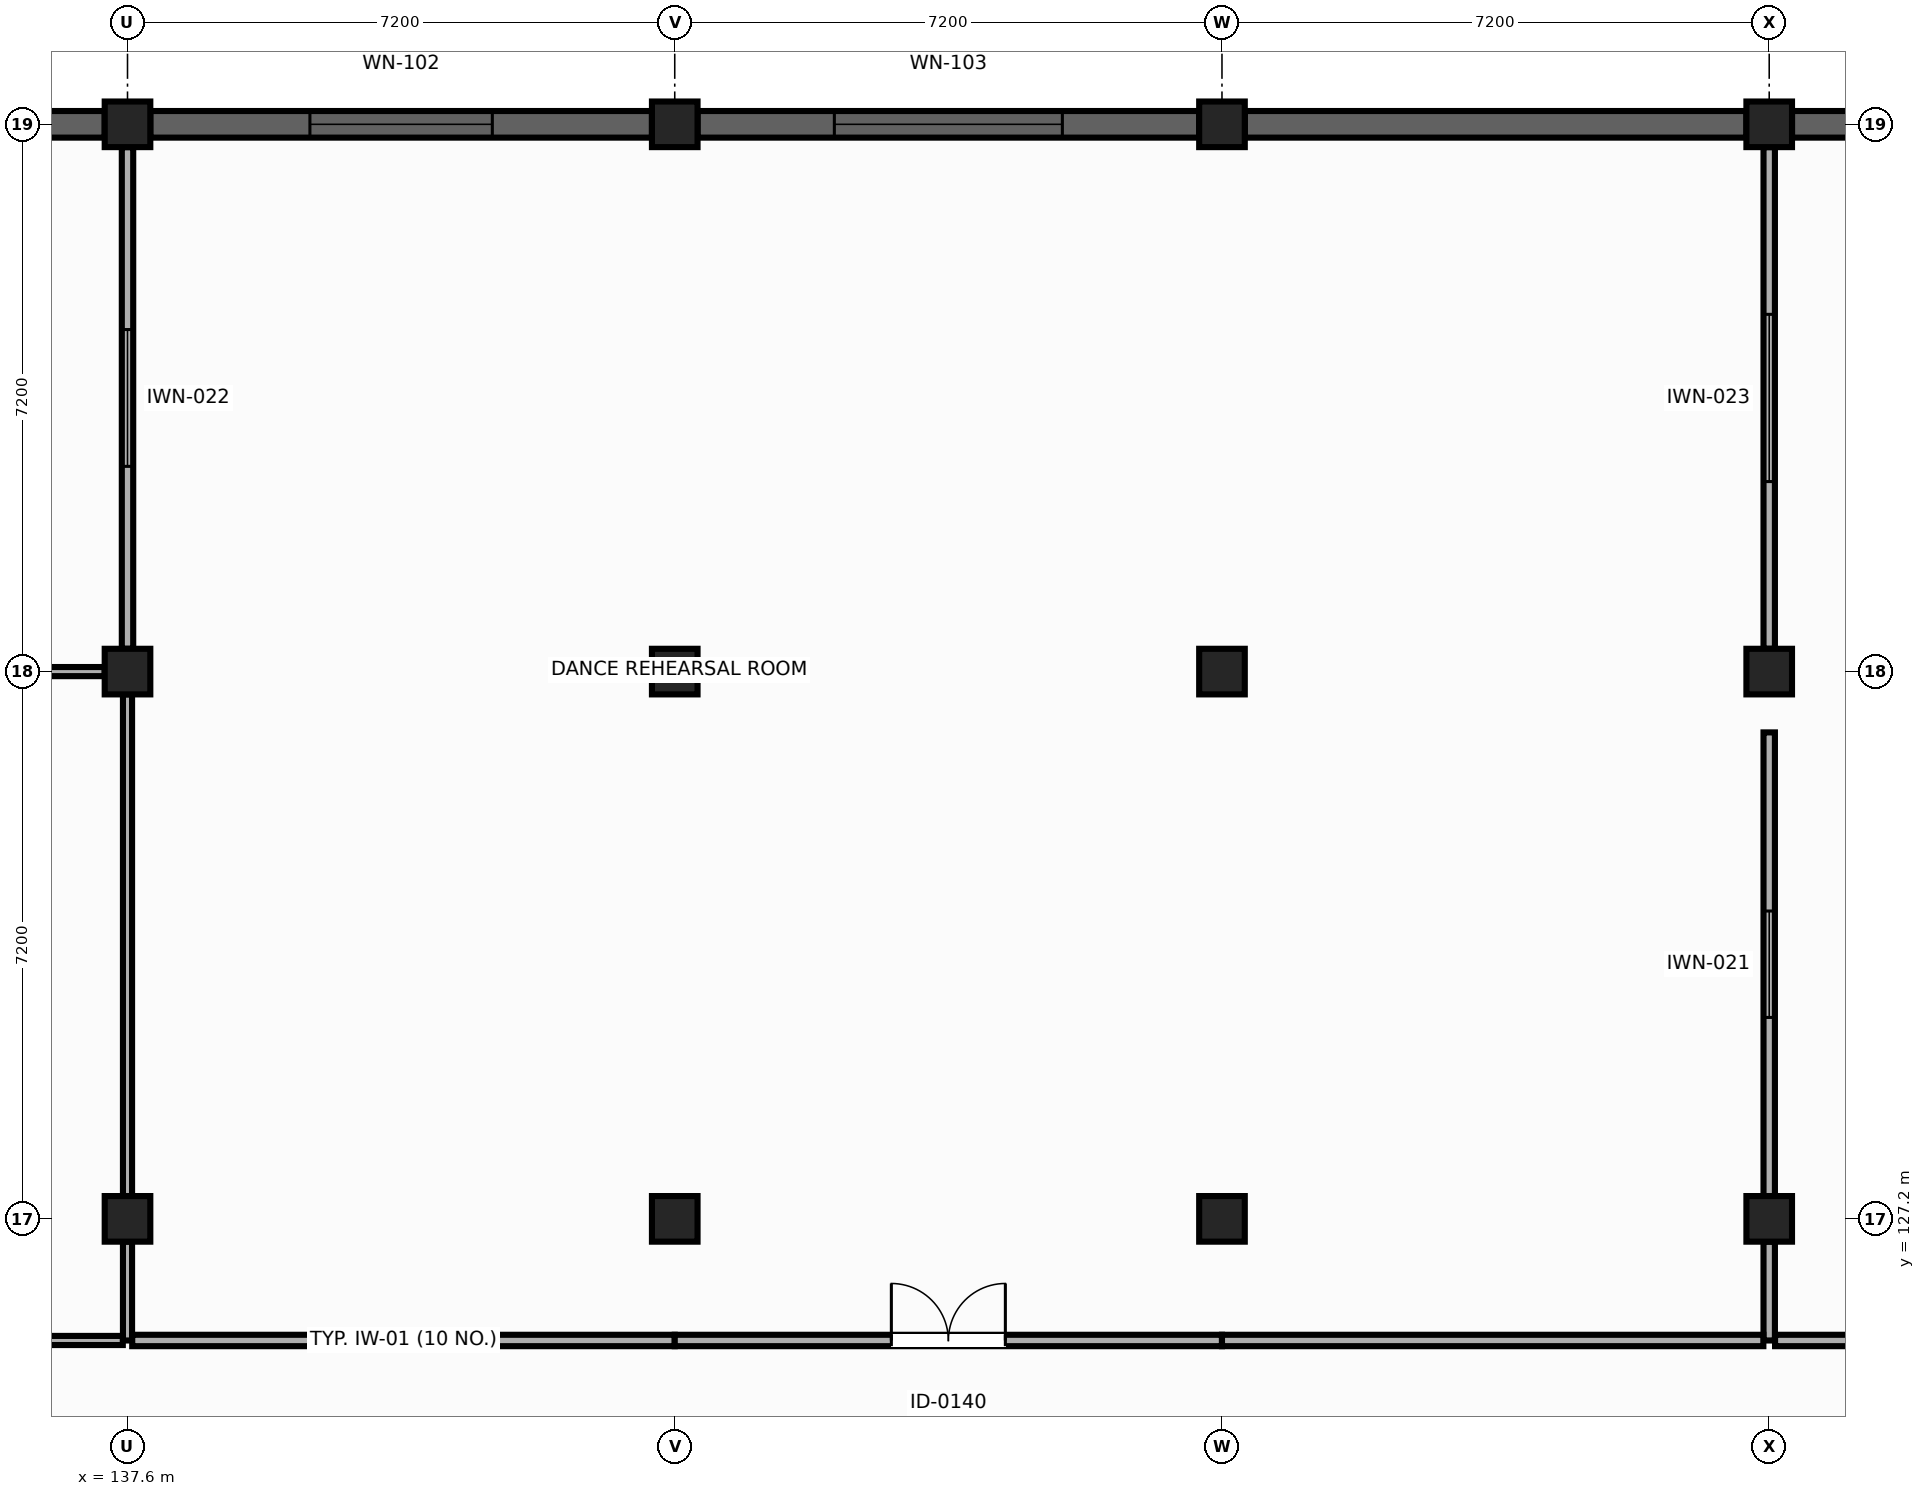
"""IFC4 building model, lengths in metres.
Left out: names, types, materials, properties, quantities, classifications, styles, units other than length and angle.
Written with IfcOpenShell. Run it as: python <this file> out.ifc"""

import sys

from ifc_helpers import new_model, si_unit, direction, frame, frame_2d, origin, origin_2d, place, context, subcontext, project, spatial, rectangle, extrude, element, fill, save


model = new_model("IFC4")
c1 = context("Model", 3, precision=1e-05, world=origin(), true_north=direction((0.0, 1.0)))
c2 = subcontext(c1, "Body", "Model", "MODEL_VIEW")
j1 = project(units=[si_unit("LENGTHUNIT", "METRE"), si_unit("PLANEANGLEUNIT", "RADIAN")], contexts=[c1])
p1 = place(None, origin())
s1 = spatial("IfcSite", under=j1, at=p1, CompositionType="ELEMENT")
p2 = place(p1, origin())
s2 = spatial("IfcBuilding", under=s1, at=p2, CompositionType="ELEMENT")
p3 = place(p2, frame((0.0, 0.0, 9.9)))
s3 = spatial("IfcBuildingStorey", under=s2, at=p3, CompositionType="ELEMENT", Elevation=9.9)
for number, where, z_axis, x_axis in (
    (1, (137.6, 127.2, 0.0), (0.0, 0.0, 1.0), (1.0, 0.0, 0.0)),
    (2, (144.8, 127.2, 0.0), (0.0, 0.0, 1.0), (1.0, 0.0, 0.0)),
    (3, (152.0, 127.2, 0.0), (0.0, 0.0, 1.0), (0.0, 1.0, 0.0)),
    (4, (159.2, 127.2, 0.0), (0.0, 0.0, 1.0), (1.0, 0.0, 0.0)),
    (5, (137.6, 134.4, 0.0), (0.0, 0.0, 1.0), (1.0, 0.0, 0.0)),
    (6, (144.8, 134.4, 0.0), (0.0, 0.0, 1.0), (0.0, 1.0, 0.0)),
    (7, (152.0, 134.4, 0.0), (0.0, 0.0, 1.0), (1.0, 0.0, 0.0)),
    (8, (159.2, 134.4, 0.0), (0.0, 0.0, 1.0), (0.0, 1.0, 0.0)),
    (9, (137.6, 141.6, 0.0), (0.0, 0.0, 1.0), (0.0, 1.0, 0.0)),
    (10, (144.8, 141.6, 0.0), (0.0, 0.0, 1.0), (1.0, 0.0, 0.0)),
    (11, (152.0, 141.6, 0.0), (0.0, 0.0, 1.0), (0.0, 1.0, 0.0)),
    (12, (159.2, 141.6, 0.0), (0.0, 0.0, 1.0), (1.0, 0.0, 0.0)),
):
    element("IfcColumn", number, at=place(p3, frame(where, z_axis=z_axis, x_axis=x_axis)), inside=s3, PredefinedType="COLUMN", context=c2, shape_type="SweptSolid", body=[
        extrude(rectangle(XDim=0.6, YDim=0.6, at=origin_2d()), origin(), (0.0, 0.0, 1.0), 4.5),
    ])
p4 = place(p3, frame((130.7, 141.6, 0.0), z_axis=(0.0, 0.0, 1.0), x_axis=(1.0, 0.0, 0.0)))
e13 = element("IfcWall", 13, at=p4, inside=s3, PredefinedType="SOLIDWALL", context=c2, shape_type="SweptSolid", body=[
    extrude(rectangle(XDim=6.6, YDim=0.35, at=frame_2d((3.3, 0.0))), origin(), (0.0, 0.0, 1.0), 4.22),
])
p5 = place(p4, frame((2.4, 0.0, 0.85)))
e14 = element("IfcOpeningElement", 14, at=p5, cuts=e13, PredefinedType="OPENING", context=c2, shape_type="SweptSolid", body=[
    extrude(rectangle(XDim=1.8, YDim=1.2, at=frame_2d((0.9, 0.6))), frame((0.0, 0.185, 0.0), z_axis=(0.0, -1.0, 0.0), x_axis=(1.0, 0.0, 0.0)), (0.0, 0.0, 1.0), 0.37),
])
p6 = place(p3, frame((137.9, 141.6, 0.0), z_axis=(0.0, 0.0, 1.0), x_axis=(1.0, 0.0, 0.0)))
e15 = element("IfcWall", 15, at=p6, inside=s3, PredefinedType="SOLIDWALL", context=c2, shape_type="SweptSolid", body=[
    extrude(rectangle(XDim=6.6, YDim=0.35, at=frame_2d((3.3, 0.0))), origin(), (0.0, 0.0, 1.0), 4.22),
])
p7 = place(p6, frame((2.1, 0.0, 0.85)))
e16 = element("IfcOpeningElement", 16, at=p7, cuts=e15, PredefinedType="OPENING", context=c2, shape_type="SweptSolid", body=[
    extrude(rectangle(XDim=2.4, YDim=1.2, at=frame_2d((1.2, 0.6))), frame((0.0, 0.185, 0.0), z_axis=(0.0, -1.0, 0.0), x_axis=(1.0, 0.0, 0.0)), (0.0, 0.0, 1.0), 0.37),
])
p8 = place(p3, frame((145.1, 141.6, 0.0), z_axis=(0.0, 0.0, 1.0), x_axis=(1.0, 0.0, 0.0)))
e17 = element("IfcWall", 17, at=p8, inside=s3, PredefinedType="SOLIDWALL", context=c2, shape_type="SweptSolid", body=[
    extrude(rectangle(XDim=6.6, YDim=0.35, at=frame_2d((3.3, 0.0))), origin(), (0.0, 0.0, 1.0), 4.22),
])
p9 = place(p8, frame((1.8, 0.0, 0.85)))
e18 = element("IfcOpeningElement", 18, at=p9, cuts=e17, PredefinedType="OPENING", context=c2, shape_type="SweptSolid", body=[
    extrude(rectangle(XDim=3.0, YDim=1.2, at=frame_2d((1.5, 0.6))), frame((0.0, 0.185, 0.0), z_axis=(0.0, -1.0, 0.0), x_axis=(1.0, 0.0, 0.0)), (0.0, 0.0, 1.0), 0.37),
])
p10 = place(p3, frame((152.3, 141.6, 0.0), z_axis=(0.0, 0.0, 1.0), x_axis=(1.0, 0.0, 0.0)))
e19 = element("IfcWall", 19, at=p10, inside=s3, PredefinedType="SOLIDWALL", context=c2, shape_type="SweptSolid", body=[
    extrude(rectangle(XDim=6.6, YDim=0.35, at=frame_2d((3.3, 0.0))), origin(), (0.0, 0.0, 1.0), 4.22),
])
p11 = place(p3, frame((159.5, 141.6, 0.0), z_axis=(0.0, 0.0, 1.0), x_axis=(1.0, 0.0, 0.0)))
e20 = element("IfcWall", 20, at=p11, inside=s3, PredefinedType="SOLIDWALL", context=c2, shape_type="SweptSolid", body=[
    extrude(rectangle(XDim=6.6, YDim=0.35, at=frame_2d((3.3, 0.0))), origin(), (0.0, 0.0, 1.0), 4.22),
])
p12 = place(p3, frame((137.6, 127.5, 0.0), z_axis=(0.0, 0.0, 1.0), x_axis=(0.0, 1.0, 0.0)))
e21 = element("IfcWall", 21, at=p12, inside=s3, PredefinedType="PARTITIONING", context=c2, shape_type="SweptSolid", body=[
    extrude(rectangle(XDim=6.6, YDim=0.12, at=frame_2d((3.3, 0.0))), origin(), (0.0, 0.0, 1.0), 3.515),
])
p13 = place(p3, frame((137.6, 125.6, 0.0), z_axis=(0.0, 0.0, 1.0), x_axis=(0.0, 1.0, 0.0)))
e22 = element("IfcWall", 22, at=p13, inside=s3, PredefinedType="PARTITIONING", context=c2, shape_type="SweptSolid", body=[
    extrude(rectangle(XDim=1.3, YDim=0.12, at=frame_2d((0.65, 0.0))), origin(), (0.0, 0.0, 1.0), 3.515),
])
p14 = place(p3, frame((137.3, 134.4, 0.0), z_axis=(0.0, 0.0, 1.0), x_axis=(-1.0, 0.0, 0.0)))
e23 = element("IfcWall", 23, at=p14, inside=s3, PredefinedType="PARTITIONING", context=c2, shape_type="SweptSolid", body=[
    extrude(rectangle(XDim=6.6, YDim=0.12, at=frame_2d((3.3, 0.0))), origin(), (0.0, 0.0, 1.0), 3.715),
])
p15 = place(p3, frame((130.4, 125.6, 0.0), z_axis=(0.0, 0.0, 1.0), x_axis=(1.0, 0.0, 0.0)))
e24 = element("IfcWall", 24, at=p15, inside=s3, PredefinedType="PARTITIONING", context=c2, shape_type="SweptSolid", body=[
    extrude(rectangle(XDim=7.138, YDim=0.12, at=frame_2d((3.569, 0.0))), origin(), (0.0, 0.0, 1.0), 3.515),
])
p16 = place(p3, frame((159.2, 127.5, 0.0), z_axis=(0.0, 0.0, 1.0), x_axis=(0.0, 1.0, 0.0)))
e25 = element("IfcWall", 25, at=p16, inside=s3, PredefinedType="PARTITIONING", context=c2, shape_type="SweptSolid", body=[
    extrude(rectangle(XDim=6.1, YDim=0.15, at=frame_2d((3.05, 0.0))), origin(), (0.0, 0.0, 1.0), 3.515),
])
p17 = place(p16, frame((2.35, 0.0, 1.1)))
e26 = element("IfcOpeningElement", 26, at=p17, cuts=e25, PredefinedType="OPENING", context=c2, shape_type="SweptSolid", body=[
    extrude(rectangle(XDim=1.4, YDim=1.3, at=frame_2d((0.7, 0.65))), frame((0.0, 0.085, 0.0), z_axis=(0.0, -1.0, 0.0), x_axis=(1.0, 0.0, 0.0)), (0.0, 0.0, 1.0), 0.17),
])
p18 = place(p3, frame((159.2, 125.6, 0.0), z_axis=(0.0, 0.0, 1.0), x_axis=(0.0, 1.0, 0.0)))
e27 = element("IfcWall", 27, at=p18, inside=s3, PredefinedType="PARTITIONING", context=c2, shape_type="SweptSolid", body=[
    extrude(rectangle(XDim=1.3, YDim=0.15, at=frame_2d((0.65, 0.0))), origin(), (0.0, 0.0, 1.0), 3.515),
])
p19 = place(p3, frame((159.2, 134.7, 0.0), z_axis=(0.0, 0.0, 1.0), x_axis=(0.0, 1.0, 0.0)))
e28 = element("IfcWall", 28, at=p19, inside=s3, PredefinedType="PARTITIONING", context=c2, shape_type="SweptSolid", body=[
    extrude(rectangle(XDim=6.6, YDim=0.15, at=frame_2d((3.3, 0.0))), origin(), (0.0, 0.0, 1.0), 3.515),
])
p20 = place(p19, frame((2.2, 0.0, 1.1)))
e29 = element("IfcOpeningElement", 29, at=p20, cuts=e28, PredefinedType="OPENING", context=c2, shape_type="SweptSolid", body=[
    extrude(rectangle(XDim=2.2, YDim=1.3, at=frame_2d((1.1, 0.65))), frame((0.0, 0.085, 0.0), z_axis=(0.0, -1.0, 0.0), x_axis=(1.0, 0.0, 0.0)), (0.0, 0.0, 1.0), 0.17),
])
p21 = place(p3, frame((137.6, 141.3, 0.0), z_axis=(0.0, 0.0, 1.0), x_axis=(0.0, -1.0, 0.0)))
e30 = element("IfcWall", 30, at=p21, inside=s3, PredefinedType="PARTITIONING", context=c2, shape_type="SweptSolid", body=[
    extrude(rectangle(XDim=6.6, YDim=0.15, at=frame_2d((3.3, 0.0))), origin(), (0.0, 0.0, 1.0), 3.515),
])
p22 = place(p21, frame((2.4, 0.0, 1.1)))
e31 = element("IfcOpeningElement", 31, at=p22, cuts=e30, PredefinedType="OPENING", context=c2, shape_type="SweptSolid", body=[
    extrude(rectangle(XDim=1.8, YDim=1.3, at=frame_2d((0.9, 0.65))), frame((0.0, 0.085, 0.0), z_axis=(0.0, -1.0, 0.0), x_axis=(1.0, 0.0, 0.0)), (0.0, 0.0, 1.0), 0.17),
])
p23 = place(p3, frame((137.662, 125.6, 0.0), z_axis=(0.0, 0.0, 1.0), x_axis=(1.0, 0.0, 0.0)))
e32 = element("IfcWall", 32, at=p23, inside=s3, PredefinedType="PARTITIONING", context=c2, shape_type="SweptSolid", body=[
    extrude(rectangle(XDim=7.138, YDim=0.15, at=frame_2d((3.569, 0.0))), origin(), (0.0, 0.0, 1.0), 3.515),
])
p24 = place(p3, frame((144.8, 125.6, 0.0), z_axis=(0.0, 0.0, 1.0), x_axis=(1.0, 0.0, 0.0)))
e33 = element("IfcWall", 33, at=p24, inside=s3, PredefinedType="PARTITIONING", context=c2, shape_type="SweptSolid", body=[
    extrude(rectangle(XDim=7.2, YDim=0.15, at=frame_2d((3.6, 0.0))), origin(), (0.0, 0.0, 1.0), 3.515),
])
p25 = place(p24, frame((2.85, 0.0, 0.0)))
e34 = element("IfcOpeningElement", 34, at=p25, cuts=e33, PredefinedType="OPENING", context=c2, shape_type="SweptSolid", body=[
    extrude(rectangle(XDim=1.5, YDim=2.2, at=frame_2d((0.75, 1.1))), frame((0.0, 0.085, 0.0), z_axis=(0.0, -1.0, 0.0), x_axis=(1.0, 0.0, 0.0)), (0.0, 0.0, 1.0), 0.17),
])
p26 = place(p3, frame((152.0, 125.6, 0.0), z_axis=(0.0, 0.0, 1.0), x_axis=(1.0, 0.0, 0.0)))
e35 = element("IfcWall", 35, at=p26, inside=s3, PredefinedType="PARTITIONING", context=c2, shape_type="SweptSolid", body=[
    extrude(rectangle(XDim=7.123, YDim=0.15, at=frame_2d((3.562, 0.0))), origin(), (0.0, 0.0, 1.0), 3.515),
])
p27 = place(p3, frame((159.277, 125.6, 0.0), z_axis=(0.0, 0.0, 1.0), x_axis=(1.0, 0.0, 0.0)))
e36 = element("IfcWall", 36, at=p27, inside=s3, PredefinedType="PARTITIONING", context=c2, shape_type="SweptSolid", body=[
    extrude(rectangle(XDim=7.123, YDim=0.15, at=frame_2d((3.562, 0.0))), origin(), (0.0, 0.0, 1.0), 3.515),
])
p28 = place(p7, origin())
e37 = element("IfcWindow", 37, at=p28, inside=s3, PartitioningType="SINGLE_PANEL", PredefinedType="WINDOW", context=c2, shape_type="SweptSolid", body=[
    extrude(rectangle(XDim=2.4, YDim=1.2, at=frame_2d((1.2, 0.6))), frame((0.0, 0.03, 0.0), z_axis=(0.0, -1.0, 0.0), x_axis=(1.0, 0.0, 0.0)), (0.0, 0.0, 1.0), 0.06),
])
fill(e16, e37)
p29 = place(p9, origin())
e38 = element("IfcWindow", 38, at=p29, inside=s3, PartitioningType="SINGLE_PANEL", PredefinedType="WINDOW", context=c2, shape_type="SweptSolid", body=[
    extrude(rectangle(XDim=3.0, YDim=1.2, at=frame_2d((1.5, 0.6))), frame((0.0, 0.03, 0.0), z_axis=(0.0, -1.0, 0.0), x_axis=(1.0, 0.0, 0.0)), (0.0, 0.0, 1.0), 0.06),
])
fill(e18, e38)
p30 = place(p25, origin())
e39 = element("IfcDoor", 39, at=p30, inside=s3, OperationType="DOUBLE_DOOR_SINGLE_SWING", PredefinedType="DOOR", context=c2, shape_type="SweptSolid", body=[
    extrude(rectangle(XDim=1.5, YDim=2.2, at=frame_2d((0.75, 1.1))), frame((0.0, 0.025, 0.0), z_axis=(0.0, -1.0, 0.0), x_axis=(1.0, 0.0, 0.0)), (0.0, 0.0, 1.0), 0.05),
])
fill(e34, e39)
p31 = place(p17, origin())
e40 = element("IfcWindow", 40, at=p31, inside=s3, PartitioningType="SINGLE_PANEL", PredefinedType="WINDOW", context=c2, shape_type="SweptSolid", body=[
    extrude(rectangle(XDim=1.4, YDim=1.3, at=frame_2d((0.7, 0.65))), frame((0.0, 0.03, 0.0), z_axis=(0.0, -1.0, 0.0), x_axis=(1.0, 0.0, 0.0)), (0.0, 0.0, 1.0), 0.06),
])
fill(e26, e40)
p32 = place(p22, origin())
e41 = element("IfcWindow", 41, at=p32, inside=s3, PartitioningType="SINGLE_PANEL", PredefinedType="WINDOW", context=c2, shape_type="SweptSolid", body=[
    extrude(rectangle(XDim=1.8, YDim=1.3, at=frame_2d((0.9, 0.65))), frame((0.0, 0.03, 0.0), z_axis=(0.0, -1.0, 0.0), x_axis=(1.0, 0.0, 0.0)), (0.0, 0.0, 1.0), 0.06),
])
fill(e31, e41)
p33 = place(p20, origin())
e42 = element("IfcWindow", 42, at=p33, inside=s3, PartitioningType="SINGLE_PANEL", PredefinedType="WINDOW", context=c2, shape_type="SweptSolid", body=[
    extrude(rectangle(XDim=2.2, YDim=1.3, at=frame_2d((1.1, 0.65))), frame((0.0, 0.03, 0.0), z_axis=(0.0, -1.0, 0.0), x_axis=(1.0, 0.0, 0.0)), (0.0, 0.0, 1.0), 0.06),
])
fill(e29, e42)
save(model, sys.argv[1])
